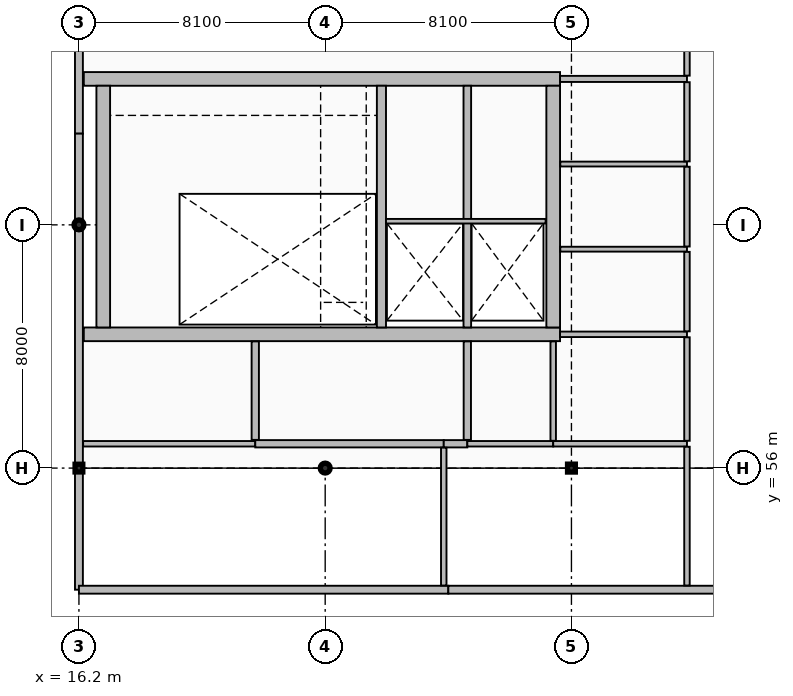
"""IFC4 building model, lengths in metres.
Left out: names, types, materials, properties, quantities, classifications, styles, units other than length and angle.
Written with IfcOpenShell. Run it as: python <this file> out.ifc"""

import sys

from ifc_helpers import new_model, si_unit, direction, frame, frame_2d, origin, origin_2d, place, context, subcontext, project, spatial, rectangle, hollow_rectangle, hollow_circle, i_section, extrude, element, fill, save


model = new_model("IFC4")
c1 = context("Model", 3, precision=1e-05, world=origin(), true_north=direction((0.0, 1.0)))
c2 = subcontext(c1, "Body", "Model", "MODEL_VIEW")
j1 = project(units=[si_unit("LENGTHUNIT", "METRE"), si_unit("PLANEANGLEUNIT", "RADIAN")], contexts=[c1])
p1 = place(None, origin())
s1 = spatial("IfcSite", under=j1, at=p1, CompositionType="ELEMENT")
p2 = place(p1, origin())
s2 = spatial("IfcBuilding", under=s1, at=p2, CompositionType="ELEMENT")
p3 = place(p2, frame((0.0, 0.0, 29.1)))
s3 = spatial("IfcBuildingStorey", under=s2, at=p3, CompositionType="ELEMENT", Elevation=29.1)
p4 = place(p3, frame((16.36, 60.4, 0.0), z_axis=(0.0, 0.0, 1.0), x_axis=(1.0, 0.0, 0.0)))
e1 = element("IfcWall", 1, at=p4, inside=s3, PredefinedType="SHEAR", context=c2, shape_type="SweptSolid", body=[
    extrude(rectangle(XDim=15.665, YDim=0.45, at=frame_2d((7.833, 0.0))), origin(), (0.0, 0.0, 1.0), 4.2),
])
p5 = place(p4, frame((1.39, 0.0, 0.0)))
e2 = element("IfcOpeningElement", 2, at=p5, cuts=e1, PredefinedType="OPENING", context=c2, shape_type="SweptSolid", body=[
    extrude(rectangle(XDim=1.15, YDim=2.25, at=frame_2d((0.575, 1.125))), frame((0.0, 0.235, 0.0), z_axis=(0.0, -1.0, 0.0), x_axis=(1.0, 0.0, 0.0)), (0.0, 0.0, 1.0), 0.47),
])
p6 = place(p4, frame((10.673, 0.0, 0.0)))
e3 = element("IfcOpeningElement", 3, at=p6, cuts=e1, PredefinedType="OPENING", context=c2, shape_type="SweptSolid", body=[
    extrude(rectangle(XDim=1.1, YDim=2.2, at=frame_2d((0.55, 1.1))), frame((0.0, 0.235, 0.0), z_axis=(0.0, -1.0, 0.0), x_axis=(1.0, 0.0, 0.0)), (0.0, 0.0, 1.0), 0.47),
])
p7 = place(p4, frame((13.387, 0.0, 0.0)))
e4 = element("IfcOpeningElement", 4, at=p7, cuts=e1, PredefinedType="OPENING", context=c2, shape_type="SweptSolid", body=[
    extrude(rectangle(XDim=1.1, YDim=2.2, at=frame_2d((0.55, 1.1))), frame((0.0, 0.235, 0.0), z_axis=(0.0, -1.0, 0.0), x_axis=(1.0, 0.0, 0.0)), (0.0, 0.0, 1.0), 0.47),
])
p8 = place(p3, frame((16.36, 68.8, 0.0), z_axis=(0.0, 0.0, 1.0), x_axis=(1.0, 0.0, 0.0)))
e5 = element("IfcWall", 5, at=p8, inside=s3, PredefinedType="SHEAR", context=c2, shape_type="SweptSolid", body=[
    extrude(rectangle(XDim=15.665, YDim=0.45, at=frame_2d((7.833, 0.0))), origin(), (0.0, 0.0, 1.0), 4.2),
])
for number, where, z_axis, x_axis in (
    (6, (17.0, 60.625, 0.0), (0.0, 0.0, 1.0), (0.0, 1.0, 0.0)),
    (7, (31.8, 60.625, 0.0), (0.0, 0.0, 1.0), (0.0, 1.0, 0.0)),
):
    element("IfcWall", number, at=place(p3, frame(where, z_axis=z_axis, x_axis=x_axis)), inside=s3, PredefinedType="SHEAR", context=c2, shape_type="SweptSolid", body=[
        extrude(rectangle(XDim=7.95, YDim=0.45, at=frame_2d((3.975, 0.0))), origin(), (0.0, 0.0, 1.0), 4.2),
    ])
p9 = place(p3, frame((26.15, 60.625, 0.0), z_axis=(0.0, 0.0, 1.0), x_axis=(0.0, 1.0, 0.0)))
e8 = element("IfcWall", 8, at=p9, inside=s3, PredefinedType="SHEAR", context=c2, shape_type="SweptSolid", body=[
    extrude(rectangle(XDim=7.95, YDim=0.3, at=frame_2d((3.975, 0.0))), origin(), (0.0, 0.0, 1.0), 4.2),
])
p10 = place(p3, frame((28.975, 60.625, 0.0), z_axis=(0.0, 0.0, 1.0), x_axis=(0.0, 1.0, 0.0)))
e9 = element("IfcWall", 9, at=p10, inside=s3, PredefinedType="SHEAR", context=c2, shape_type="SweptSolid", body=[
    extrude(rectangle(XDim=7.95, YDim=0.25, at=frame_2d((3.975, 0.0))), origin(), (0.0, 0.0, 1.0), 4.2),
])
p11 = place(p3, frame((16.2, 56.0, 0.0), z_axis=(0.0, 0.0, 1.0), x_axis=(1.0, 0.0, 0.0)))
e10 = element("IfcColumn", 10, at=p11, inside=s3, PredefinedType="COLUMN", context=c2, shape_type="SweptSolid", body=[
    extrude(hollow_rectangle(XDim=0.254, YDim=0.254, WallThickness=0.013, InnerFilletRadius=0.013, OuterFilletRadius=0.025, at=origin_2d()), origin(), (0.0, 0.0, 1.0), 4.2),
])
for number, where, z_axis, x_axis in (
    (11, (16.2, 64.0, 0.0), (0.0, 0.0, 1.0), (1.0, 0.0, 0.0)),
    (12, (24.3, 56.0, 0.0), (0.0, 0.0, 1.0), (1.0, 0.0, 0.0)),
):
    element("IfcColumn", number, at=place(p3, frame(where, z_axis=z_axis, x_axis=x_axis)), inside=s3, PredefinedType="COLUMN", context=c2, shape_type="SweptSolid", body=[
        extrude(hollow_circle(Radius=0.162, WallThickness=0.013, at=origin_2d()), origin(), (0.0, 0.0, 1.0), 4.2),
    ])
p12 = place(p3, frame((32.4, 56.0, 0.0), z_axis=(0.0, 0.0, 1.0), x_axis=(1.0, 0.0, 0.0)))
e13 = element("IfcColumn", 13, at=p12, inside=s3, PredefinedType="COLUMN", context=c2, shape_type="SweptSolid", body=[
    extrude(i_section(OverallWidth=0.256, OverallDepth=0.26, WebThickness=0.011, FlangeThickness=0.017, FilletRadius=0.013, at=origin_2d()), origin(), (0.0, 0.0, 1.0), 4.2),
])
for number, where, z_axis, x_axis in (
    (14, (16.2, 82.0, 0.0), (0.0, 0.0, 1.0), (0.0, -1.0, 0.0)),
    (15, (16.2, 67.0, 0.0), (0.0, 0.0, 1.0), (0.0, -1.0, 0.0)),
):
    element("IfcWall", number, at=place(p3, frame(where, z_axis=z_axis, x_axis=x_axis)), inside=s3, PredefinedType="SOLIDWALL", context=c2, shape_type="SweptSolid", body=[
        extrude(rectangle(XDim=15.0, YDim=0.26, at=frame_2d((7.5, 0.0))), origin(), (0.0, 0.0, 1.0), 3.452),
    ])
p13 = place(p3, frame((16.2, 52.0, 0.0), z_axis=(0.0, 0.0, 1.0), x_axis=(1.0, 0.0, 0.0)))
e16 = element("IfcWall", 16, at=p13, inside=s3, PredefinedType="SOLIDWALL", context=c2, shape_type="SweptSolid", body=[
    extrude(rectangle(XDim=12.15, YDim=0.26, at=frame_2d((6.075, 0.0))), origin(), (0.0, 0.0, 1.0), 3.96),
])
p14 = place(p13, frame((5.05, 0.0, 0.0)))
e17 = element("IfcOpeningElement", 17, at=p14, cuts=e16, PredefinedType="OPENING", context=c2, shape_type="SweptSolid", body=[
    extrude(rectangle(XDim=1.5, YDim=2.3, at=frame_2d((0.75, 1.15))), frame((0.0, 0.14, 0.0), z_axis=(0.0, -1.0, 0.0), x_axis=(1.0, 0.0, 0.0)), (0.0, 0.0, 1.0), 0.28),
])
p15 = place(p3, frame((28.35, 52.0, 0.0), z_axis=(0.0, 0.0, 1.0), x_axis=(1.0, 0.0, 0.0)))
e18 = element("IfcWall", 18, at=p15, inside=s3, PredefinedType="SOLIDWALL", context=c2, shape_type="SweptSolid", body=[
    extrude(rectangle(XDim=12.15, YDim=0.26, at=frame_2d((6.075, 0.0))), origin(), (0.0, 0.0, 1.0), 3.96),
])
p16 = place(p15, frame((5.4, 0.0, 0.85)))
e19 = element("IfcOpeningElement", 19, at=p16, cuts=e18, PredefinedType="OPENING", context=c2, shape_type="SweptSolid", body=[
    extrude(rectangle(XDim=0.9, YDim=2.4, at=frame_2d((0.45, 1.2))), frame((0.0, 0.14, 0.0), z_axis=(0.0, -1.0, 0.0), x_axis=(1.0, 0.0, 0.0)), (0.0, 0.0, 1.0), 0.28),
])
p17 = place(p3, frame((26.3, 64.12, 0.0), z_axis=(0.0, 0.0, 1.0), x_axis=(1.0, 0.0, 0.0)))
e20 = element("IfcWall", 20, at=p17, inside=s3, PredefinedType="PARTITIONING", context=c2, shape_type="SweptSolid", body=[
    extrude(rectangle(XDim=5.25, YDim=0.15, at=frame_2d((2.625, 0.0))), origin(), (0.0, 0.0, 1.0), 3.96),
])
p18 = place(p3, frame((16.338, 56.8, 0.0), z_axis=(0.0, 0.0, 1.0), x_axis=(1.0, 0.0, 0.0)))
e21 = element("IfcWall", 21, at=p18, inside=s3, PredefinedType="PARTITIONING", context=c2, shape_type="SweptSolid", body=[
    extrude(rectangle(XDim=5.662, YDim=0.18, at=frame_2d((2.831, 0.0))), origin(), (0.0, 0.0, 1.0), 3.96),
])
p19 = place(p18, frame((2.281, 0.0, 0.0)))
e22 = element("IfcOpeningElement", 22, at=p19, cuts=e21, PredefinedType="OPENING", context=c2, shape_type="SweptSolid", body=[
    extrude(rectangle(XDim=1.1, YDim=2.2, at=frame_2d((0.55, 1.1))), frame((0.0, 0.1, 0.0), z_axis=(0.0, -1.0, 0.0), x_axis=(1.0, 0.0, 0.0)), (0.0, 0.0, 1.0), 0.2),
])
p20 = place(p3, frame((22.0, 56.8, 0.0), z_axis=(0.0, 0.0, 1.0), x_axis=(1.0, 0.0, 0.0)))
e23 = element("IfcWall", 23, at=p20, inside=s3, PredefinedType="PARTITIONING", context=c2, shape_type="SweptSolid", body=[
    extrude(rectangle(XDim=6.2, YDim=0.24, at=frame_2d((3.1, 0.0))), origin(), (0.0, 0.0, 1.0), 3.96),
])
p21 = place(p20, frame((3.988, 0.0, 0.0)))
e24 = element("IfcOpeningElement", 24, at=p21, cuts=e23, PredefinedType="OPENING", context=c2, shape_type="SweptSolid", body=[
    extrude(rectangle(XDim=1.2, YDim=2.3, at=frame_2d((0.6, 1.15))), frame((0.0, 0.13, 0.0), z_axis=(0.0, -1.0, 0.0), x_axis=(1.0, 0.0, 0.0)), (0.0, 0.0, 1.0), 0.26),
])
p22 = place(p3, frame((28.2, 56.8, 0.0), z_axis=(0.0, 0.0, 1.0), x_axis=(1.0, 0.0, 0.0)))
e25 = element("IfcWall", 25, at=p22, inside=s3, PredefinedType="PARTITIONING", context=c2, shape_type="SweptSolid", body=[
    extrude(rectangle(XDim=0.775, YDim=0.24, at=frame_2d((0.388, 0.0))), origin(), (0.0, 0.0, 1.0), 3.96),
])
p23 = place(p3, frame((28.975, 56.8, 0.0), z_axis=(0.0, 0.0, 1.0), x_axis=(1.0, 0.0, 0.0)))
e26 = element("IfcWall", 26, at=p23, inside=s3, PredefinedType="PARTITIONING", context=c2, shape_type="SweptSolid", body=[
    extrude(rectangle(XDim=2.825, YDim=0.18, at=frame_2d((1.413, 0.0))), origin(), (0.0, 0.0, 1.0), 3.96),
])
p24 = place(p23, frame((0.863, 0.0, 0.0)))
e27 = element("IfcOpeningElement", 27, at=p24, cuts=e26, PredefinedType="OPENING", context=c2, shape_type="SweptSolid", body=[
    extrude(rectangle(XDim=1.1, YDim=2.2, at=frame_2d((0.55, 1.1))), frame((0.0, 0.1, 0.0), z_axis=(0.0, -1.0, 0.0), x_axis=(1.0, 0.0, 0.0)), (0.0, 0.0, 1.0), 0.2),
])
p25 = place(p3, frame((31.8, 56.8, 0.0), z_axis=(0.0, 0.0, 1.0), x_axis=(1.0, 0.0, 0.0)))
e28 = element("IfcWall", 28, at=p25, inside=s3, PredefinedType="PARTITIONING", context=c2, shape_type="SweptSolid", body=[
    extrude(rectangle(XDim=4.4, YDim=0.18, at=frame_2d((2.2, 0.0))), origin(), (0.0, 0.0, 1.0), 3.96),
])
p26 = place(p3, frame((32.025, 60.4, 0.0), z_axis=(0.0, 0.0, 1.0), x_axis=(1.0, 0.0, 0.0)))
e29 = element("IfcWall", 29, at=p26, inside=s3, PredefinedType="PARTITIONING", context=c2, shape_type="SweptSolid", body=[
    extrude(rectangle(XDim=4.175, YDim=0.18, at=frame_2d((2.087, 0.0))), origin(), (0.0, 0.0, 1.0), 3.96),
])
for number, where, z_axis, x_axis in (
    (30, (32.033, 63.2, 0.0), (0.0, 0.0, 1.0), (1.0, 0.0, 0.0)),
    (31, (32.033, 66.0, 0.0), (0.0, 0.0, 1.0), (1.0, 0.0, 0.0)),
):
    element("IfcWall", number, at=place(p3, frame(where, z_axis=z_axis, x_axis=x_axis)), inside=s3, PredefinedType="PARTITIONING", context=c2, shape_type="SweptSolid", body=[
        extrude(rectangle(XDim=4.167, YDim=0.16, at=frame_2d((2.083, 0.0))), origin(), (0.0, 0.0, 1.0), 3.96),
    ])
p27 = place(p3, frame((32.025, 68.8, 0.0), z_axis=(0.0, 0.0, 1.0), x_axis=(1.0, 0.0, 0.0)))
e32 = element("IfcWall", 32, at=p27, inside=s3, PredefinedType="PARTITIONING", context=c2, shape_type="SweptSolid", body=[
    extrude(rectangle(XDim=4.175, YDim=0.2, at=frame_2d((2.087, 0.0))), origin(), (0.0, 0.0, 1.0), 3.96),
])
p28 = place(p3, frame((22.0, 56.928, 0.0), z_axis=(0.0, 0.0, 1.0), x_axis=(0.0, 1.0, 0.0)))
e33 = element("IfcWall", 33, at=p28, inside=s3, PredefinedType="PARTITIONING", context=c2, shape_type="SweptSolid", body=[
    extrude(rectangle(XDim=3.239, YDim=0.24, at=frame_2d((1.62, 0.0))), origin(), (0.0, 0.0, 1.0), 3.96),
])
p29 = place(p28, frame((1.119, 0.0, 0.0)))
e34 = element("IfcOpeningElement", 34, at=p29, cuts=e33, PredefinedType="OPENING", context=c2, shape_type="SweptSolid", body=[
    extrude(rectangle(XDim=1.0, YDim=2.2, at=frame_2d((0.5, 1.1))), frame((0.0, 0.13, 0.0), z_axis=(0.0, -1.0, 0.0), x_axis=(1.0, 0.0, 0.0)), (0.0, 0.0, 1.0), 0.26),
])
p30 = place(p3, frame((28.2, 52.138, 0.0), z_axis=(0.0, 0.0, 1.0), x_axis=(0.0, 1.0, 0.0)))
e35 = element("IfcWall", 35, at=p30, inside=s3, PredefinedType="PARTITIONING", context=c2, shape_type="SweptSolid", body=[
    extrude(rectangle(XDim=4.534, YDim=0.18, at=frame_2d((2.267, 0.0))), origin(), (0.0, 0.0, 1.0), 3.96),
])
p31 = place(p30, frame((1.767, 0.0, 0.0)))
e36 = element("IfcOpeningElement", 36, at=p31, cuts=e35, PredefinedType="OPENING", context=c2, shape_type="SweptSolid", body=[
    extrude(rectangle(XDim=1.0, YDim=2.2, at=frame_2d((0.5, 1.1))), frame((0.0, 0.1, 0.0), z_axis=(0.0, -1.0, 0.0), x_axis=(1.0, 0.0, 0.0)), (0.0, 0.0, 1.0), 0.2),
])
p32 = place(p3, frame((28.975, 56.928, 0.0), z_axis=(0.0, 0.0, 1.0), x_axis=(0.0, 1.0, 0.0)))
e37 = element("IfcWall", 37, at=p32, inside=s3, PredefinedType="PARTITIONING", context=c2, shape_type="SweptSolid", body=[
    extrude(rectangle(XDim=3.239, YDim=0.24, at=frame_2d((1.62, 0.0))), origin(), (0.0, 0.0, 1.0), 3.96),
])
p33 = place(p3, frame((31.8, 56.898, 0.0), z_axis=(0.0, 0.0, 1.0), x_axis=(0.0, 1.0, 0.0)))
e38 = element("IfcWall", 38, at=p33, inside=s3, PredefinedType="PARTITIONING", context=c2, shape_type="SweptSolid", body=[
    extrude(rectangle(XDim=3.269, YDim=0.18, at=frame_2d((1.635, 0.0))), origin(), (0.0, 0.0, 1.0), 3.96),
])
p34 = place(p3, frame((36.2, 52.138, 0.0), z_axis=(0.0, 0.0, 1.0), x_axis=(0.0, 1.0, 0.0)))
e39 = element("IfcWall", 39, at=p34, inside=s3, PredefinedType="PARTITIONING", context=c2, shape_type="SweptSolid", body=[
    extrude(rectangle(XDim=4.564, YDim=0.18, at=frame_2d((2.282, 0.0))), origin(), (0.0, 0.0, 1.0), 3.96),
])
p35 = place(p34, frame((1.732, 0.0, 0.0)))
e40 = element("IfcOpeningElement", 40, at=p35, cuts=e39, PredefinedType="OPENING", context=c2, shape_type="SweptSolid", body=[
    extrude(rectangle(XDim=1.1, YDim=2.2, at=frame_2d((0.55, 1.1))), frame((0.0, 0.1, 0.0), z_axis=(0.0, -1.0, 0.0), x_axis=(1.0, 0.0, 0.0)), (0.0, 0.0, 1.0), 0.2),
])
p36 = place(p3, frame((36.2, 56.898, 0.0), z_axis=(0.0, 0.0, 1.0), x_axis=(0.0, 1.0, 0.0)))
e41 = element("IfcWall", 41, at=p36, inside=s3, PredefinedType="PARTITIONING", context=c2, shape_type="SweptSolid", body=[
    extrude(rectangle(XDim=3.404, YDim=0.18, at=frame_2d((1.702, 0.0))), origin(), (0.0, 0.0, 1.0), 3.96),
])
p37 = place(p36, frame((1.202, 0.0, 0.0)))
e42 = element("IfcOpeningElement", 42, at=p37, cuts=e41, PredefinedType="OPENING", context=c2, shape_type="SweptSolid", body=[
    extrude(rectangle(XDim=1.0, YDim=2.15, at=frame_2d((0.5, 1.075))), frame((0.0, 0.1, 0.0), z_axis=(0.0, -1.0, 0.0), x_axis=(1.0, 0.0, 0.0)), (0.0, 0.0, 1.0), 0.2),
])
p38 = place(p3, frame((36.2, 60.498, 0.0), z_axis=(0.0, 0.0, 1.0), x_axis=(0.0, 1.0, 0.0)))
e43 = element("IfcWall", 43, at=p38, inside=s3, PredefinedType="PARTITIONING", context=c2, shape_type="SweptSolid", body=[
    extrude(rectangle(XDim=2.614, YDim=0.18, at=frame_2d((1.307, 0.0))), origin(), (0.0, 0.0, 1.0), 3.96),
])
p39 = place(p38, frame((0.832, 0.0, 0.0)))
e44 = element("IfcOpeningElement", 44, at=p39, cuts=e43, PredefinedType="OPENING", context=c2, shape_type="SweptSolid", body=[
    extrude(rectangle(XDim=0.95, YDim=2.1, at=frame_2d((0.475, 1.05))), frame((0.0, 0.1, 0.0), z_axis=(0.0, -1.0, 0.0), x_axis=(1.0, 0.0, 0.0)), (0.0, 0.0, 1.0), 0.2),
])
p40 = place(p3, frame((36.2, 63.288, 0.0), z_axis=(0.0, 0.0, 1.0), x_axis=(0.0, 1.0, 0.0)))
e45 = element("IfcWall", 45, at=p40, inside=s3, PredefinedType="PARTITIONING", context=c2, shape_type="SweptSolid", body=[
    extrude(rectangle(XDim=2.624, YDim=0.18, at=frame_2d((1.312, 0.0))), origin(), (0.0, 0.0, 1.0), 3.96),
])
p41 = place(p40, frame((0.837, 0.0, 0.0)))
e46 = element("IfcOpeningElement", 46, at=p41, cuts=e45, PredefinedType="OPENING", context=c2, shape_type="SweptSolid", body=[
    extrude(rectangle(XDim=0.95, YDim=2.1, at=frame_2d((0.475, 1.05))), frame((0.0, 0.1, 0.0), z_axis=(0.0, -1.0, 0.0), x_axis=(1.0, 0.0, 0.0)), (0.0, 0.0, 1.0), 0.2),
])
p42 = place(p3, frame((36.2, 66.088, 0.0), z_axis=(0.0, 0.0, 1.0), x_axis=(0.0, 1.0, 0.0)))
e47 = element("IfcWall", 47, at=p42, inside=s3, PredefinedType="PARTITIONING", context=c2, shape_type="SweptSolid", body=[
    extrude(rectangle(XDim=2.604, YDim=0.18, at=frame_2d((1.302, 0.0))), origin(), (0.0, 0.0, 1.0), 3.96),
])
p43 = place(p42, frame((0.802, 0.0, 0.0)))
e48 = element("IfcOpeningElement", 48, at=p43, cuts=e47, PredefinedType="OPENING", context=c2, shape_type="SweptSolid", body=[
    extrude(rectangle(XDim=1.0, YDim=2.15, at=frame_2d((0.5, 1.075))), frame((0.0, 0.1, 0.0), z_axis=(0.0, -1.0, 0.0), x_axis=(1.0, 0.0, 0.0)), (0.0, 0.0, 1.0), 0.2),
])
p44 = place(p3, frame((36.2, 68.908, 0.0), z_axis=(0.0, 0.0, 1.0), x_axis=(0.0, 1.0, 0.0)))
e49 = element("IfcWall", 49, at=p44, inside=s3, PredefinedType="PARTITIONING", context=c2, shape_type="SweptSolid", body=[
    extrude(rectangle(XDim=11.484, YDim=0.18, at=frame_2d((5.742, 0.0))), origin(), (0.0, 0.0, 1.0), 3.598),
])
p45 = place(p44, frame((5.192, 0.0, 0.0)))
e50 = element("IfcOpeningElement", 50, at=p45, cuts=e49, PredefinedType="OPENING", context=c2, shape_type="SweptSolid", body=[
    extrude(rectangle(XDim=1.1, YDim=2.2, at=frame_2d((0.55, 1.1))), frame((0.0, 0.1, 0.0), z_axis=(0.0, -1.0, 0.0), x_axis=(1.0, 0.0, 0.0)), (0.0, 0.0, 1.0), 0.2),
])
p46 = place(p14, frame((1.5, 0.0, 0.0), z_axis=(0.0, 0.0, 1.0), x_axis=(-1.0, 0.0, 0.0)))
e51 = element("IfcDoor", 51, at=p46, inside=s3, OperationType="DOUBLE_DOOR_SINGLE_SWING", PredefinedType="DOOR", context=c2, shape_type="SweptSolid", body=[
    extrude(rectangle(XDim=1.5, YDim=2.3, at=frame_2d((0.75, 1.15))), frame((0.0, 0.025, 0.0), z_axis=(0.0, -1.0, 0.0), x_axis=(1.0, 0.0, 0.0)), (0.0, 0.0, 1.0), 0.05),
])
fill(e17, e51)
p47 = place(p16, origin())
e52 = element("IfcWindow", 52, at=p47, inside=s3, PartitioningType="DOUBLE_PANEL_HORIZONTAL", PredefinedType="WINDOW", context=c2, shape_type="SweptSolid", body=[
    extrude(rectangle(XDim=0.9, YDim=2.4, at=frame_2d((0.45, 1.2))), frame((0.0, 0.03, 0.0), z_axis=(0.0, -1.0, 0.0), x_axis=(1.0, 0.0, 0.0)), (0.0, 0.0, 1.0), 0.06),
])
fill(e19, e52)
p48 = place(p5, origin())
e53 = element("IfcDoor", 53, at=p48, inside=s3, OperationType="SINGLE_SWING_RIGHT", PredefinedType="DOOR", context=c2, shape_type="SweptSolid", body=[
    extrude(rectangle(XDim=1.15, YDim=2.25, at=frame_2d((0.575, 1.125))), frame((0.0, 0.025, 0.0), z_axis=(0.0, -1.0, 0.0), x_axis=(1.0, 0.0, 0.0)), (0.0, 0.0, 1.0), 0.05),
])
fill(e2, e53)
p49 = place(p6, frame((1.1, 0.0, 0.0), z_axis=(0.0, 0.0, 1.0), x_axis=(-1.0, 0.0, 0.0)))
e54 = element("IfcDoor", 54, at=p49, inside=s3, OperationType="DOUBLE_DOOR_SLIDING", PredefinedType="DOOR", context=c2, shape_type="SweptSolid", body=[
    extrude(rectangle(XDim=1.1, YDim=2.2, at=frame_2d((0.55, 1.1))), frame((0.0, 0.025, 0.0), z_axis=(0.0, -1.0, 0.0), x_axis=(1.0, 0.0, 0.0)), (0.0, 0.0, 1.0), 0.05),
])
fill(e3, e54)
p50 = place(p7, frame((1.1, 0.0, 0.0), z_axis=(0.0, 0.0, 1.0), x_axis=(-1.0, 0.0, 0.0)))
e55 = element("IfcDoor", 55, at=p50, inside=s3, OperationType="DOUBLE_DOOR_SLIDING", PredefinedType="DOOR", context=c2, shape_type="SweptSolid", body=[
    extrude(rectangle(XDim=1.1, YDim=2.2, at=frame_2d((0.55, 1.1))), frame((0.0, 0.025, 0.0), z_axis=(0.0, -1.0, 0.0), x_axis=(1.0, 0.0, 0.0)), (0.0, 0.0, 1.0), 0.05),
])
fill(e4, e55)
p51 = place(p19, frame((1.1, 0.0, 0.0), z_axis=(0.0, 0.0, 1.0), x_axis=(-1.0, 0.0, 0.0)))
e56 = element("IfcDoor", 56, at=p51, inside=s3, OperationType="SINGLE_SWING_RIGHT", PredefinedType="DOOR", context=c2, shape_type="SweptSolid", body=[
    extrude(rectangle(XDim=1.1, YDim=2.2, at=frame_2d((0.55, 1.1))), frame((0.0, 0.025, 0.0), z_axis=(0.0, -1.0, 0.0), x_axis=(1.0, 0.0, 0.0)), (0.0, 0.0, 1.0), 0.05),
])
fill(e22, e56)
p52 = place(p21, frame((1.2, 0.0, 0.0), z_axis=(0.0, 0.0, 1.0), x_axis=(-1.0, 0.0, 0.0)))
e57 = element("IfcDoor", 57, at=p52, inside=s3, OperationType="SINGLE_SWING_LEFT", PredefinedType="DOOR", context=c2, shape_type="SweptSolid", body=[
    extrude(rectangle(XDim=1.2, YDim=2.3, at=frame_2d((0.6, 1.15))), frame((0.0, 0.025, 0.0), z_axis=(0.0, -1.0, 0.0), x_axis=(1.0, 0.0, 0.0)), (0.0, 0.0, 1.0), 0.05),
])
fill(e24, e57)
p53 = place(p24, frame((1.1, 0.0, 0.0), z_axis=(0.0, 0.0, 1.0), x_axis=(-1.0, 0.0, 0.0)))
e58 = element("IfcDoor", 58, at=p53, inside=s3, OperationType="SINGLE_SWING_RIGHT", PredefinedType="DOOR", context=c2, shape_type="SweptSolid", body=[
    extrude(rectangle(XDim=1.1, YDim=2.2, at=frame_2d((0.55, 1.1))), frame((0.0, 0.025, 0.0), z_axis=(0.0, -1.0, 0.0), x_axis=(1.0, 0.0, 0.0)), (0.0, 0.0, 1.0), 0.05),
])
fill(e27, e58)
p54 = place(p29, origin())
e59 = element("IfcDoor", 59, at=p54, inside=s3, OperationType="SINGLE_SWING_RIGHT", PredefinedType="DOOR", context=c2, shape_type="SweptSolid", body=[
    extrude(rectangle(XDim=1.0, YDim=2.2, at=frame_2d((0.5, 1.1))), frame((0.0, 0.025, 0.0), z_axis=(0.0, -1.0, 0.0), x_axis=(1.0, 0.0, 0.0)), (0.0, 0.0, 1.0), 0.05),
])
fill(e34, e59)
p55 = place(p31, origin())
e60 = element("IfcDoor", 60, at=p55, inside=s3, OperationType="SINGLE_SWING_LEFT", PredefinedType="DOOR", context=c2, shape_type="SweptSolid", body=[
    extrude(rectangle(XDim=1.0, YDim=2.2, at=frame_2d((0.5, 1.1))), frame((0.0, 0.025, 0.0), z_axis=(0.0, -1.0, 0.0), x_axis=(1.0, 0.0, 0.0)), (0.0, 0.0, 1.0), 0.05),
])
fill(e36, e60)
p56 = place(p35, origin())
e61 = element("IfcDoor", 61, at=p56, inside=s3, OperationType="SINGLE_SWING_RIGHT", PredefinedType="DOOR", context=c2, shape_type="SweptSolid", body=[
    extrude(rectangle(XDim=1.1, YDim=2.2, at=frame_2d((0.55, 1.1))), frame((0.0, 0.025, 0.0), z_axis=(0.0, -1.0, 0.0), x_axis=(1.0, 0.0, 0.0)), (0.0, 0.0, 1.0), 0.05),
])
fill(e40, e61)
p57 = place(p37, origin())
e62 = element("IfcDoor", 62, at=p57, inside=s3, OperationType="SINGLE_SWING_LEFT", PredefinedType="DOOR", context=c2, shape_type="SweptSolid", body=[
    extrude(rectangle(XDim=1.0, YDim=2.15, at=frame_2d((0.5, 1.075))), frame((0.0, 0.025, 0.0), z_axis=(0.0, -1.0, 0.0), x_axis=(1.0, 0.0, 0.0)), (0.0, 0.0, 1.0), 0.05),
])
fill(e42, e62)
p58 = place(p39, origin())
e63 = element("IfcDoor", 63, at=p58, inside=s3, OperationType="SINGLE_SWING_RIGHT", PredefinedType="DOOR", context=c2, shape_type="SweptSolid", body=[
    extrude(rectangle(XDim=0.95, YDim=2.1, at=frame_2d((0.475, 1.05))), frame((0.0, 0.025, 0.0), z_axis=(0.0, -1.0, 0.0), x_axis=(1.0, 0.0, 0.0)), (0.0, 0.0, 1.0), 0.05),
])
fill(e44, e63)
p59 = place(p41, origin())
e64 = element("IfcDoor", 64, at=p59, inside=s3, OperationType="SINGLE_SWING_LEFT", PredefinedType="DOOR", context=c2, shape_type="SweptSolid", body=[
    extrude(rectangle(XDim=0.95, YDim=2.1, at=frame_2d((0.475, 1.05))), frame((0.0, 0.025, 0.0), z_axis=(0.0, -1.0, 0.0), x_axis=(1.0, 0.0, 0.0)), (0.0, 0.0, 1.0), 0.05),
])
fill(e46, e64)
p60 = place(p43, origin())
e65 = element("IfcDoor", 65, at=p60, inside=s3, OperationType="SINGLE_SWING_RIGHT", PredefinedType="DOOR", context=c2, shape_type="SweptSolid", body=[
    extrude(rectangle(XDim=1.0, YDim=2.15, at=frame_2d((0.5, 1.075))), frame((0.0, 0.025, 0.0), z_axis=(0.0, -1.0, 0.0), x_axis=(1.0, 0.0, 0.0)), (0.0, 0.0, 1.0), 0.05),
])
fill(e48, e65)
save(model, sys.argv[1])
